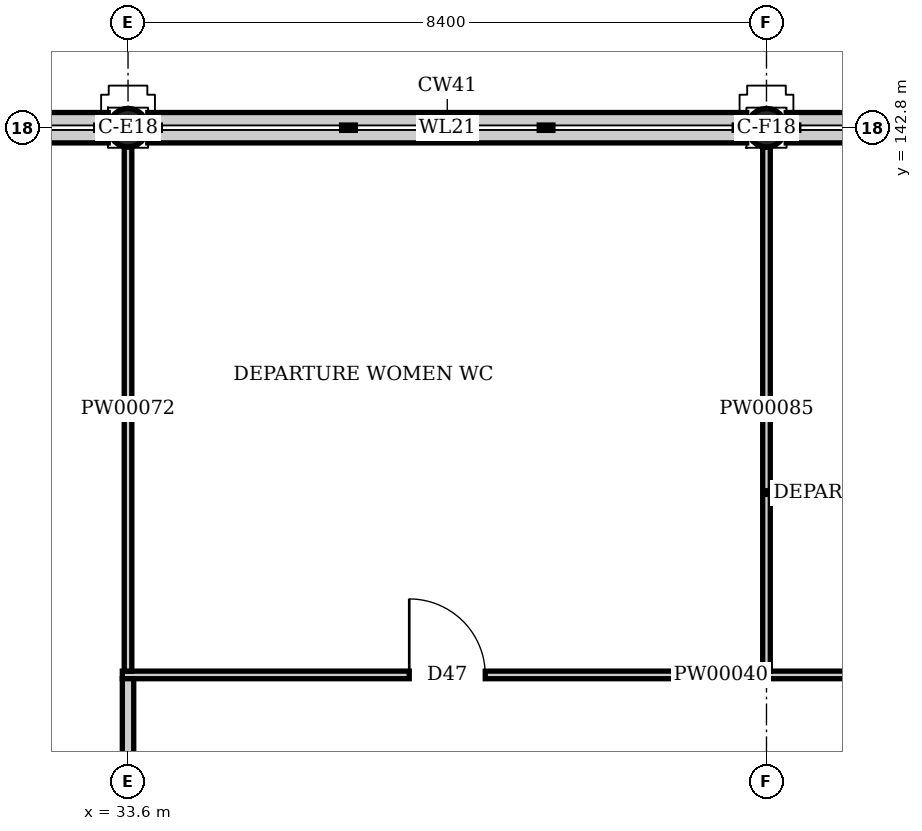
"""IFC4 building model, lengths in metres.
Left out: names, types, materials, properties, quantities, classifications, styles, units other than length and angle.
Written with IfcOpenShell. Run it as: python <this file> out.ifc"""

import sys

from ifc_helpers import new_model, si_unit, direction, frame, frame_2d, origin, origin_2d, place, context, subcontext, project, spatial, rectangle, hollow_circle, extrude, element, fill, save


model = new_model("IFC4")
c1 = context("Model", 3, precision=1e-05, world=origin(), true_north=direction((0.0, 1.0)))
c2 = subcontext(c1, "Body", "Model", "MODEL_VIEW")
j1 = project(units=[si_unit("LENGTHUNIT", "METRE"), si_unit("PLANEANGLEUNIT", "RADIAN")], contexts=[c1])
p1 = place(None, origin())
s1 = spatial("IfcSite", under=j1, at=p1, CompositionType="ELEMENT")
p2 = place(p1, origin())
s2 = spatial("IfcBuilding", under=s1, at=p2, CompositionType="ELEMENT")
p3 = place(p2, origin())
s3 = spatial("IfcBuildingStorey", under=s2, at=p3, CompositionType="ELEMENT", Elevation=0.0)
for number, where, z_axis, x_axis in (
    (1, (33.6, 142.8, -0.7), (0.0, 0.0, 1.0), (1.0, 0.0, 0.0)),
    (2, (42.0, 142.8, -0.7), (0.0, 0.0, 1.0), (1.0, 0.0, 0.0)),
):
    element("IfcColumn", number, at=place(p3, frame(where, z_axis=z_axis, x_axis=x_axis)), inside=s3, PredefinedType="COLUMN", context=c2, shape_type="SweptSolid", body=[
        extrude(hollow_circle(Radius=0.254, WallThickness=0.016, at=origin_2d()), origin(), (0.0, 0.0, 1.0), 6.7),
    ])
p4 = place(p3, frame((25.46, 142.8, 0.0), z_axis=(0.0, 0.0, 1.0), x_axis=(1.0, 0.0, 0.0)))
e3 = element("IfcWall", 3, at=p4, inside=s3, PredefinedType="SOLIDWALL", context=c2, shape_type="SweptSolid", body=[
    extrude(rectangle(XDim=7.88, YDim=0.4, at=frame_2d((3.94, 0.0))), origin(), (0.0, 0.0, 1.0), 1.2),
])
for number, where, z_axis, x_axis in (
    (4, (33.86, 142.8, 0.0), (0.0, 0.0, 1.0), (1.0, 0.0, 0.0)),
    (5, (42.26, 142.8, 0.0), (0.0, 0.0, 1.0), (1.0, 0.0, 0.0)),
):
    element("IfcWall", number, at=place(p3, frame(where, z_axis=z_axis, x_axis=x_axis)), inside=s3, PredefinedType="SOLIDWALL", context=c2, shape_type="SweptSolid", body=[
        extrude(rectangle(XDim=7.88, YDim=0.4, at=frame_2d((3.94, 0.0))), origin(), (0.0, 0.0, 1.0), 1.2),
    ])
p5 = place(p3, frame((33.525, 135.6, 0.0), z_axis=(0.0, 0.0, 1.0), x_axis=(1.0, 0.0, 0.0)))
e6 = element("IfcWall", 6, at=p5, inside=s3, PredefinedType="PARTITIONING", context=c2, shape_type="SweptSolid", body=[
    extrude(rectangle(XDim=16.95, YDim=0.1, at=frame_2d((8.475, 0.0))), origin(), (0.0, 0.0, 1.0), 10.8),
])
p6 = place(p5, frame((3.775, 0.0, 0.0)))
e7 = element("IfcOpeningElement", 7, at=p6, cuts=e6, PredefinedType="OPENING", context=c2, shape_type="SweptSolid", body=[
    extrude(rectangle(XDim=1.0, YDim=2.1, at=frame_2d((0.5, 1.05))), frame((0.0, 0.06, 0.0), z_axis=(0.0, -1.0, 0.0), x_axis=(1.0, 0.0, 0.0)), (0.0, 0.0, 1.0), 0.12),
])
p7 = place(p5, frame((10.975, 0.0, 0.0)))
e8 = element("IfcOpeningElement", 8, at=p7, cuts=e6, PredefinedType="OPENING", context=c2, shape_type="SweptSolid", body=[
    extrude(rectangle(XDim=1.0, YDim=2.1, at=frame_2d((0.5, 1.05))), frame((0.0, 0.06, 0.0), z_axis=(0.0, -1.0, 0.0), x_axis=(1.0, 0.0, 0.0)), (0.0, 0.0, 1.0), 0.12),
])
p8 = place(p5, frame((15.175, 0.0, 0.0)))
e9 = element("IfcOpeningElement", 9, at=p8, cuts=e6, PredefinedType="OPENING", context=c2, shape_type="SweptSolid", body=[
    extrude(rectangle(XDim=1.0, YDim=2.1, at=frame_2d((0.5, 1.05))), frame((0.0, 0.06, 0.0), z_axis=(0.0, -1.0, 0.0), x_axis=(1.0, 0.0, 0.0)), (0.0, 0.0, 1.0), 0.12),
])
p9 = place(p3, frame((33.6, 133.275, 0.0), z_axis=(0.0, 0.0, 1.0), x_axis=(0.0, 1.0, 0.0)))
e10 = element("IfcWall", 10, at=p9, inside=s3, PredefinedType="PARTITIONING", context=c2, shape_type="SweptSolid", body=[
    extrude(rectangle(XDim=2.275, YDim=0.15, at=frame_2d((1.138, 0.0))), origin(), (0.0, 0.0, 1.0), 10.338),
])
for number, where, z_axis, x_axis in (
    (11, (33.6, 135.65, 0.0), (0.0, 0.0, 1.0), (0.0, 1.0, 0.0)),
    (12, (42.0, 135.65, 0.0), (0.0, 0.0, 1.0), (0.0, 1.0, 0.0)),
):
    element("IfcWall", number, at=place(p3, frame(where, z_axis=z_axis, x_axis=x_axis)), inside=s3, PredefinedType="PARTITIONING", context=c2, shape_type="SweptSolid", body=[
        extrude(rectangle(XDim=6.896, YDim=0.1, at=frame_2d((3.448, 0.0))), origin(), (0.0, 0.0, 1.0), 10.338),
    ])
p10 = place(p6, origin())
e13 = element("IfcDoor", 13, at=p10, inside=s3, OperationType="SINGLE_SWING_LEFT", PredefinedType="DOOR", context=c2, shape_type="SweptSolid", body=[
    extrude(rectangle(XDim=1.0, YDim=2.1, at=frame_2d((0.5, 1.05))), frame((0.0, 0.025, 0.0), z_axis=(0.0, -1.0, 0.0), x_axis=(1.0, 0.0, 0.0)), (0.0, 0.0, 1.0), 0.05),
])
fill(e7, e13)
save(model, sys.argv[1])
